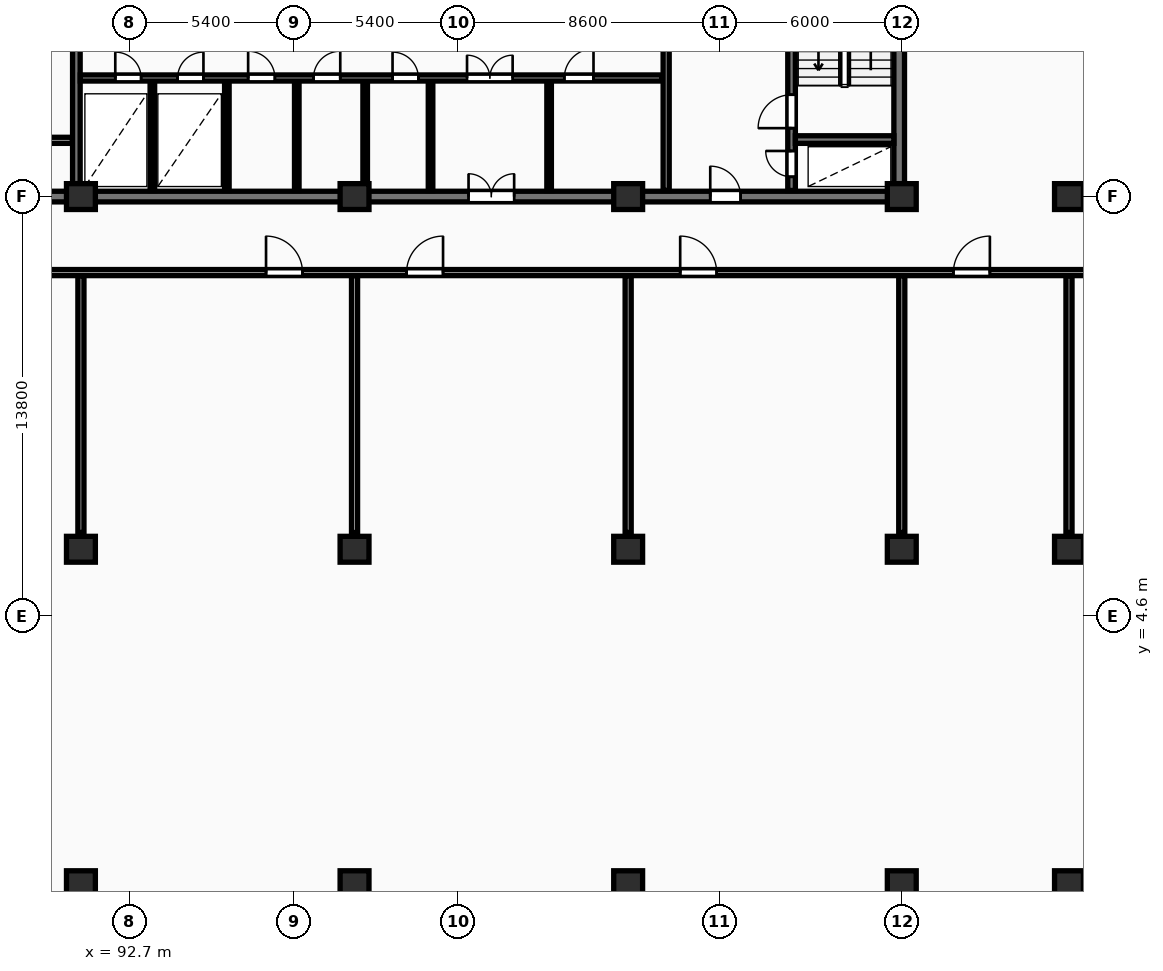
"""IFC4 building model, lengths in metres.
Left out: names, types, materials, properties, quantities, classifications, styles, units other than length and angle.
Written with IfcOpenShell. Run it as: python <this file> out.ifc"""

import sys

from ifc_helpers import new_model, si_unit, direction, frame, frame_2d, origin, origin_2d, place, context, subcontext, project, spatial, rectangle, extrude, element, fill, save


model = new_model("IFC4")
c1 = context("Model", 3, precision=1e-05, world=origin(), true_north=direction((0.0, 1.0)))
c2 = subcontext(c1, "Body", "Model", "MODEL_VIEW")
j1 = project(units=[si_unit("LENGTHUNIT", "METRE"), si_unit("PLANEANGLEUNIT", "RADIAN")], contexts=[c1])
p1 = place(None, origin())
s1 = spatial("IfcSite", under=j1, at=p1, CompositionType="ELEMENT")
p2 = place(p1, origin())
s2 = spatial("IfcBuilding", under=s1, at=p2, CompositionType="ELEMENT")
p3 = place(p2, frame((0.0, 0.0, 76.0)))
s3 = spatial("IfcBuildingStorey", under=s2, at=p3, CompositionType="ELEMENT", Elevation=76.0)
for number, where, z_axis, x_axis in (
    (1, (91.1, -4.2, 0.0), (0.0, 0.0, 1.0), (1.0, 0.0, 0.0)),
    (2, (91.1, 6.8, 0.0), (0.0, 0.0, 1.0), (1.0, 0.0, 0.0)),
    (3, (91.1, 18.4, 0.0), (0.0, 0.0, 1.0), (1.0, 0.0, 0.0)),
    (4, (100.1, -4.2, 0.0), (0.0, 0.0, 1.0), (1.0, 0.0, 0.0)),
    (5, (100.1, 6.8, 0.0), (0.0, 0.0, 1.0), (1.0, 0.0, 0.0)),
    (6, (100.1, 18.4, 0.0), (0.0, 0.0, 1.0), (1.0, 0.0, 0.0)),
    (7, (109.1, -4.2, 0.0), (0.0, 0.0, 1.0), (1.0, 0.0, 0.0)),
    (8, (109.1, 6.8, 0.0), (0.0, 0.0, 1.0), (1.0, 0.0, 0.0)),
    (9, (109.1, 18.4, 0.0), (0.0, 0.0, 1.0), (1.0, 0.0, 0.0)),
    (10, (118.1, -4.2, 0.0), (0.0, 0.0, 1.0), (1.0, 0.0, 0.0)),
    (11, (118.1, 6.8, 0.0), (0.0, 0.0, 1.0), (1.0, 0.0, 0.0)),
    (12, (118.1, 18.4, 0.0), (0.0, 0.0, 1.0), (1.0, 0.0, 0.0)),
    (13, (123.6, -4.2, 0.0), (0.0, 0.0, 1.0), (1.0, 0.0, 0.0)),
    (14, (123.6, 6.8, 0.0), (0.0, 0.0, 1.0), (1.0, 0.0, 0.0)),
    (15, (123.6, 18.4, 0.0), (0.0, 0.0, 1.0), (1.0, 0.0, 0.0)),
):
    element("IfcColumn", number, at=place(p3, frame(where, z_axis=z_axis, x_axis=x_axis)), inside=s3, PredefinedType="COLUMN", context=c2, shape_type="SweptSolid", body=[
        extrude(rectangle(XDim=0.95, YDim=0.85, at=origin_2d()), origin(), (0.0, 0.0, 1.0), 4.8),
    ])
p4 = place(p3, frame((118.015, 18.575, 0.0), z_axis=(0.0, 0.0, 1.0), x_axis=(0.0, 1.0, 0.0)))
e16 = element("IfcWall", 16, at=p4, inside=s3, PredefinedType="SHEAR", context=c2, shape_type="SweptSolid", body=[
    extrude(rectangle(XDim=11.65, YDim=0.35, at=frame_2d((5.825, 0.0))), origin(), (0.0, 0.0, 1.0), 4.8),
])
p5 = place(p3, frame((81.925, 18.4, 0.0), z_axis=(0.0, 0.0, 1.0), x_axis=(1.0, 0.0, 0.0)))
e17 = element("IfcWall", 17, at=p5, inside=s3, PredefinedType="SHEAR", context=c2, shape_type="SweptSolid", body=[
    extrude(rectangle(XDim=36.265, YDim=0.35, at=frame_2d((18.132, 0.0))), origin(), (0.0, 0.0, 1.0), 4.8),
])
p6 = place(p5, frame((5.675, 0.0, 0.0)))
e18 = element("IfcOpeningElement", 18, at=p6, cuts=e17, PredefinedType="OPENING", context=c2, shape_type="SweptSolid", body=[
    extrude(rectangle(XDim=1.0, YDim=2.15, at=frame_2d((0.5, 1.075))), frame((0.0, 0.185, 0.0), z_axis=(0.0, -1.0, 0.0), x_axis=(1.0, 0.0, 0.0)), (0.0, 0.0, 1.0), 0.37),
])
p7 = place(p5, frame((21.925, 0.0, 0.0)))
e19 = element("IfcOpeningElement", 19, at=p7, cuts=e17, PredefinedType="OPENING", context=c2, shape_type="SweptSolid", body=[
    extrude(rectangle(XDim=1.5, YDim=2.2, at=frame_2d((0.75, 1.1))), frame((0.0, 0.185, 0.0), z_axis=(0.0, -1.0, 0.0), x_axis=(1.0, 0.0, 0.0)), (0.0, 0.0, 1.0), 0.37),
])
p8 = place(p5, frame((29.875, 0.0, 0.0)))
e20 = element("IfcOpeningElement", 20, at=p8, cuts=e17, PredefinedType="OPENING", context=c2, shape_type="SweptSolid", body=[
    extrude(rectangle(XDim=1.0, YDim=2.15, at=frame_2d((0.5, 1.075))), frame((0.0, 0.185, 0.0), z_axis=(0.0, -1.0, 0.0), x_axis=(1.0, 0.0, 0.0)), (0.0, 0.0, 1.0), 0.37),
])
p9 = place(p3, frame((86.5, 20.25, 0.0), z_axis=(0.0, 0.0, 1.0), x_axis=(1.0, 0.0, 0.0)))
e21 = element("IfcWall", 21, at=p9, inside=s3, PredefinedType="PARTITIONING", context=c2, shape_type="SweptSolid", body=[
    extrude(rectangle(XDim=4.32, YDim=0.2, at=frame_2d((2.16, 0.0))), origin(), (0.0, 0.0, 1.0), 4.48),
])
p10 = place(p9, frame((1.4, 0.0, 0.0)))
e22 = element("IfcOpeningElement", 22, at=p10, cuts=e21, PredefinedType="OPENING", context=c2, shape_type="SweptSolid", body=[
    extrude(rectangle(XDim=1.1, YDim=2.1, at=frame_2d((0.55, 1.05))), frame((0.0, 0.11, 0.0), z_axis=(0.0, -1.0, 0.0), x_axis=(1.0, 0.0, 0.0)), (0.0, 0.0, 1.0), 0.22),
])
p11 = place(p3, frame((90.95, 18.6, 0.0), z_axis=(0.0, 0.0, 1.0), x_axis=(0.0, 1.0, 0.0)))
e23 = element("IfcWall", 23, at=p11, inside=s3, PredefinedType="SHEAR", context=c2, shape_type="SweptSolid", body=[
    extrude(rectangle(XDim=11.6, YDim=0.25, at=frame_2d((5.8, 0.0))), origin(), (0.0, 0.0, 1.0), 4.8),
])
p12 = place(p11, frame((4.6, 0.0, 0.0)))
e24 = element("IfcOpeningElement", 24, at=p12, cuts=e23, PredefinedType="OPENING", context=c2, shape_type="SweptSolid", body=[
    extrude(rectangle(XDim=1.1, YDim=2.1, at=frame_2d((0.55, 1.05))), frame((0.0, 0.135, 0.0), z_axis=(0.0, -1.0, 0.0), x_axis=(1.0, 0.0, 0.0)), (0.0, 0.0, 1.0), 0.27),
])
for number, where, z_axis, x_axis in (
    (25, (93.45, 18.6, 0.0), (0.0, 0.0, 1.0), (0.0, 1.0, 0.0)),
    (26, (95.9, 18.6, 0.0), (0.0, 0.0, 1.0), (0.0, 1.0, 0.0)),
    (27, (98.2, 18.6, 0.0), (0.0, 0.0, 1.0), (0.0, 1.0, 0.0)),
):
    element("IfcWall", number, at=place(p3, frame(where, z_axis=z_axis, x_axis=x_axis)), inside=s3, PredefinedType="PARTITIONING", context=c2, shape_type="SweptSolid", body=[
        extrude(rectangle(XDim=3.6, YDim=0.15, at=frame_2d((1.8, 0.0))), origin(), (0.0, 0.0, 1.0), 4.48),
    ])
p13 = place(p3, frame((100.45, 18.6, 0.0), z_axis=(0.0, 0.0, 1.0), x_axis=(0.0, 1.0, 0.0)))
e28 = element("IfcWall", 28, at=p13, inside=s3, PredefinedType="PARTITIONING", context=c2, shape_type="SweptSolid", body=[
    extrude(rectangle(XDim=3.6, YDim=0.15, at=frame_2d((1.8, 0.0))), origin(), (0.0, 0.0, 1.0), 3.33),
])
for number, where, z_axis, x_axis in (
    (29, (102.6, 18.6, 0.0), (0.0, 0.0, 1.0), (0.0, 1.0, 0.0)),
    (30, (106.5, 18.6, 0.0), (0.0, 0.0, 1.0), (0.0, 1.0, 0.0)),
):
    element("IfcWall", number, at=place(p3, frame(where, z_axis=z_axis, x_axis=x_axis)), inside=s3, PredefinedType="PARTITIONING", context=c2, shape_type="SweptSolid", body=[
        extrude(rectangle(XDim=3.6, YDim=0.15, at=frame_2d((1.8, 0.0))), origin(), (0.0, 0.0, 1.0), 4.48),
    ])
p14 = place(p3, frame((91.08, 22.3, 0.0), z_axis=(0.0, 0.0, 1.0), x_axis=(1.0, 0.0, 0.0)))
e31 = element("IfcWall", 31, at=p14, inside=s3, PredefinedType="PARTITIONING", context=c2, shape_type="SweptSolid", body=[
    extrude(rectangle(XDim=19.14, YDim=0.2, at=frame_2d((9.57, 0.0))), origin(), (0.0, 0.0, 1.0), 4.48),
])
p15 = place(p14, frame((1.15, 0.0, 0.0)))
e32 = element("IfcOpeningElement", 32, at=p15, cuts=e31, PredefinedType="OPENING", context=c2, shape_type="SweptSolid", body=[
    extrude(rectangle(XDim=0.85, YDim=2.05, at=frame_2d((0.425, 1.025))), frame((0.0, 0.11, 0.0), z_axis=(0.0, -1.0, 0.0), x_axis=(1.0, 0.0, 0.0)), (0.0, 0.0, 1.0), 0.22),
])
p16 = place(p14, frame((3.2, 0.0, 0.0)))
e33 = element("IfcOpeningElement", 33, at=p16, cuts=e31, PredefinedType="OPENING", context=c2, shape_type="SweptSolid", body=[
    extrude(rectangle(XDim=0.85, YDim=2.05, at=frame_2d((0.425, 1.025))), frame((0.0, 0.11, 0.0), z_axis=(0.0, -1.0, 0.0), x_axis=(1.0, 0.0, 0.0)), (0.0, 0.0, 1.0), 0.22),
])
p17 = place(p14, frame((12.72, 0.0, 0.0)))
e34 = element("IfcOpeningElement", 34, at=p17, cuts=e31, PredefinedType="OPENING", context=c2, shape_type="SweptSolid", body=[
    extrude(rectangle(XDim=1.5, YDim=2.2, at=frame_2d((0.75, 1.1))), frame((0.0, 0.11, 0.0), z_axis=(0.0, -1.0, 0.0), x_axis=(1.0, 0.0, 0.0)), (0.0, 0.0, 1.0), 0.22),
])
p18 = place(p14, frame((5.52, 0.0, 0.0)))
e35 = element("IfcOpeningElement", 35, at=p18, cuts=e31, PredefinedType="OPENING", context=c2, shape_type="SweptSolid", body=[
    extrude(rectangle(XDim=0.88, YDim=2.06, at=frame_2d((0.44, 1.03))), frame((0.0, 0.11, 0.0), z_axis=(0.0, -1.0, 0.0), x_axis=(1.0, 0.0, 0.0)), (0.0, 0.0, 1.0), 0.22),
])
p19 = place(p14, frame((7.67, 0.0, 0.0)))
e36 = element("IfcOpeningElement", 36, at=p19, cuts=e31, PredefinedType="OPENING", context=c2, shape_type="SweptSolid", body=[
    extrude(rectangle(XDim=0.88, YDim=2.06, at=frame_2d((0.44, 1.03))), frame((0.0, 0.11, 0.0), z_axis=(0.0, -1.0, 0.0), x_axis=(1.0, 0.0, 0.0)), (0.0, 0.0, 1.0), 0.22),
])
p20 = place(p14, frame((10.27, 0.0, 0.0)))
e37 = element("IfcOpeningElement", 37, at=p20, cuts=e31, PredefinedType="OPENING", context=c2, shape_type="SweptSolid", body=[
    extrude(rectangle(XDim=0.85, YDim=2.05, at=frame_2d((0.425, 1.025))), frame((0.0, 0.11, 0.0), z_axis=(0.0, -1.0, 0.0), x_axis=(1.0, 0.0, 0.0)), (0.0, 0.0, 1.0), 0.22),
])
p21 = place(p14, frame((15.92, 0.0, 0.0)))
e38 = element("IfcOpeningElement", 38, at=p21, cuts=e31, PredefinedType="OPENING", context=c2, shape_type="SweptSolid", body=[
    extrude(rectangle(XDim=0.96, YDim=2.1, at=frame_2d((0.48, 1.05))), frame((0.0, 0.11, 0.0), z_axis=(0.0, -1.0, 0.0), x_axis=(1.0, 0.0, 0.0)), (0.0, 0.0, 1.0), 0.22),
])
p22 = place(p3, frame((110.35, 18.6, 0.0), z_axis=(0.0, 0.0, 1.0), x_axis=(0.0, 1.0, 0.0)))
e39 = element("IfcWall", 39, at=p22, inside=s3, PredefinedType="PARTITIONING", context=c2, shape_type="SweptSolid", body=[
    extrude(rectangle(XDim=11.6, YDim=0.2, at=frame_2d((5.8, 0.0))), origin(), (0.0, 0.0, 1.0), 4.48),
])
p23 = place(p22, frame((5.2, 0.0, 0.0)))
e40 = element("IfcOpeningElement", 40, at=p23, cuts=e39, PredefinedType="OPENING", context=c2, shape_type="SweptSolid", body=[
    extrude(rectangle(XDim=1.1, YDim=2.15, at=frame_2d((0.55, 1.075))), frame((0.0, 0.11, 0.0), z_axis=(0.0, -1.0, 0.0), x_axis=(1.0, 0.0, 0.0)), (0.0, 0.0, 1.0), 0.22),
])
p24 = place(p3, frame((114.475, 18.6, 0.0), z_axis=(0.0, 0.0, 1.0), x_axis=(0.0, 1.0, 0.0)))
e41 = element("IfcWall", 41, at=p24, inside=s3, PredefinedType="SHEAR", context=c2, shape_type="SweptSolid", body=[
    extrude(rectangle(XDim=11.6, YDim=0.25, at=frame_2d((5.8, 0.0))), origin(), (0.0, 0.0, 1.0), 4.8),
])
p25 = place(p24, frame((0.45, 0.0, 0.0)))
e42 = element("IfcOpeningElement", 42, at=p25, cuts=e41, PredefinedType="OPENING", context=c2, shape_type="SweptSolid", body=[
    extrude(rectangle(XDim=0.85, YDim=2.05, at=frame_2d((0.425, 1.025))), frame((0.0, 0.135, 0.0), z_axis=(0.0, -1.0, 0.0), x_axis=(1.0, 0.0, 0.0)), (0.0, 0.0, 1.0), 0.27),
])
p26 = place(p24, frame((2.05, 0.0, 0.0)))
e43 = element("IfcOpeningElement", 43, at=p26, cuts=e41, PredefinedType="OPENING", context=c2, shape_type="SweptSolid", body=[
    extrude(rectangle(XDim=1.1, YDim=2.1, at=frame_2d((0.55, 1.05))), frame((0.0, 0.135, 0.0), z_axis=(0.0, -1.0, 0.0), x_axis=(1.0, 0.0, 0.0)), (0.0, 0.0, 1.0), 0.27),
])
p27 = place(p24, frame((9.95, 0.0, 0.0)))
e44 = element("IfcOpeningElement", 44, at=p27, cuts=e41, PredefinedType="OPENING", context=c2, shape_type="SweptSolid", body=[
    extrude(rectangle(XDim=0.85, YDim=2.05, at=frame_2d((0.425, 1.025))), frame((0.0, 0.135, 0.0), z_axis=(0.0, -1.0, 0.0), x_axis=(1.0, 0.0, 0.0)), (0.0, 0.0, 1.0), 0.27),
])
p28 = place(p3, frame((114.6, 20.275, 0.0), z_axis=(0.0, 0.0, 1.0), x_axis=(1.0, 0.0, 0.0)))
e45 = element("IfcWall", 45, at=p28, inside=s3, PredefinedType="SHEAR", context=c2, shape_type="SweptSolid", body=[
    extrude(rectangle(XDim=3.24, YDim=0.25, at=frame_2d((1.62, 0.0))), origin(), (0.0, 0.0, 1.0), 4.8),
])
for number, where, z_axis, x_axis in (
    (46, (91.1, 7.35, 0.0), (0.0, 0.0, 1.0), (0.0, 1.0, 0.0)),
    (47, (100.1, 7.35, 0.0), (0.0, 0.0, 1.0), (0.0, 1.0, 0.0)),
    (48, (109.1, 7.35, 0.0), (0.0, 0.0, 1.0), (0.0, 1.0, 0.0)),
    (49, (118.1, 7.35, 0.0), (0.0, 0.0, 1.0), (0.0, 1.0, 0.0)),
    (50, (123.6, 7.35, 0.0), (0.0, 0.0, 1.0), (0.0, 1.0, 0.0)),
):
    element("IfcWall", number, at=place(p3, frame(where, z_axis=z_axis, x_axis=x_axis)), inside=s3, PredefinedType="PARTITIONING", context=c2, shape_type="SweptSolid", body=[
        extrude(rectangle(XDim=8.45, YDim=0.2, at=frame_2d((4.225, 0.0))), origin(), (0.0, 0.0, 1.0), 3.33),
    ])
p29 = place(p3, frame((70.7, 15.9, 0.0), z_axis=(0.0, 0.0, 1.0), x_axis=(1.0, 0.0, 0.0)))
e51 = element("IfcWall", 51, at=p29, inside=s3, PredefinedType="PARTITIONING", context=c2, shape_type="SweptSolid", body=[
    extrude(rectangle(XDim=62.0, YDim=0.2, at=frame_2d((31.0, 0.0))), origin(), (0.0, 0.0, 1.0), 4.48),
])
p30 = place(p29, frame((8.226, 0.0, 0.0)))
e52 = element("IfcOpeningElement", 52, at=p30, cuts=e51, PredefinedType="OPENING", context=c2, shape_type="SweptSolid", body=[
    extrude(rectangle(XDim=1.5, YDim=2.18, at=frame_2d((0.75, 1.09))), frame((0.0, 0.11, 0.0), z_axis=(0.0, -1.0, 0.0), x_axis=(1.0, 0.0, 0.0)), (0.0, 0.0, 1.0), 0.22),
])
p31 = place(p29, frame((17.489, 0.0, 0.0)))
e53 = element("IfcOpeningElement", 53, at=p31, cuts=e51, PredefinedType="OPENING", context=c2, shape_type="SweptSolid", body=[
    extrude(rectangle(XDim=1.2, YDim=2.15, at=frame_2d((0.6, 1.075))), frame((0.0, 0.11, 0.0), z_axis=(0.0, -1.0, 0.0), x_axis=(1.0, 0.0, 0.0)), (0.0, 0.0, 1.0), 0.22),
])
p32 = place(p29, frame((26.489, 0.0, 0.0)))
e54 = element("IfcOpeningElement", 54, at=p32, cuts=e51, PredefinedType="OPENING", context=c2, shape_type="SweptSolid", body=[
    extrude(rectangle(XDim=1.2, YDim=2.15, at=frame_2d((0.6, 1.075))), frame((0.0, 0.11, 0.0), z_axis=(0.0, -1.0, 0.0), x_axis=(1.0, 0.0, 0.0)), (0.0, 0.0, 1.0), 0.22),
])
p33 = place(p29, frame((31.111, 0.0, 0.0)))
e55 = element("IfcOpeningElement", 55, at=p33, cuts=e51, PredefinedType="OPENING", context=c2, shape_type="SweptSolid", body=[
    extrude(rectangle(XDim=1.2, YDim=2.15, at=frame_2d((0.6, 1.075))), frame((0.0, 0.11, 0.0), z_axis=(0.0, -1.0, 0.0), x_axis=(1.0, 0.0, 0.0)), (0.0, 0.0, 1.0), 0.22),
])
p34 = place(p29, frame((40.111, 0.0, 0.0)))
e56 = element("IfcOpeningElement", 56, at=p34, cuts=e51, PredefinedType="OPENING", context=c2, shape_type="SweptSolid", body=[
    extrude(rectangle(XDim=1.2, YDim=2.15, at=frame_2d((0.6, 1.075))), frame((0.0, 0.11, 0.0), z_axis=(0.0, -1.0, 0.0), x_axis=(1.0, 0.0, 0.0)), (0.0, 0.0, 1.0), 0.22),
])
p35 = place(p29, frame((49.098, 0.0, 0.0)))
e57 = element("IfcOpeningElement", 57, at=p35, cuts=e51, PredefinedType="OPENING", context=c2, shape_type="SweptSolid", body=[
    extrude(rectangle(XDim=1.2, YDim=2.15, at=frame_2d((0.6, 1.075))), frame((0.0, 0.11, 0.0), z_axis=(0.0, -1.0, 0.0), x_axis=(1.0, 0.0, 0.0)), (0.0, 0.0, 1.0), 0.22),
])
p36 = place(p29, frame((54.662, 0.0, 0.0)))
e58 = element("IfcOpeningElement", 58, at=p36, cuts=e51, PredefinedType="OPENING", context=c2, shape_type="SweptSolid", body=[
    extrude(rectangle(XDim=1.2, YDim=2.15, at=frame_2d((0.6, 1.075))), frame((0.0, 0.11, 0.0), z_axis=(0.0, -1.0, 0.0), x_axis=(1.0, 0.0, 0.0)), (0.0, 0.0, 1.0), 0.22),
])
p37 = place(p7, origin())
e59 = element("IfcDoor", 59, at=p37, inside=s3, OperationType="DOUBLE_DOOR_SINGLE_SWING", PredefinedType="DOOR", context=c2, shape_type="SweptSolid", body=[
    extrude(rectangle(XDim=1.5, YDim=2.2, at=frame_2d((0.75, 1.1))), frame((0.0, 0.025, 0.0), z_axis=(0.0, -1.0, 0.0), x_axis=(1.0, 0.0, 0.0)), (0.0, 0.0, 1.0), 0.05),
])
fill(e19, e59)
p38 = place(p8, origin())
e60 = element("IfcDoor", 60, at=p38, inside=s3, OperationType="SINGLE_SWING_LEFT", PredefinedType="DOOR", context=c2, shape_type="SweptSolid", body=[
    extrude(rectangle(XDim=1.0, YDim=2.15, at=frame_2d((0.5, 1.075))), frame((0.0, 0.025, 0.0), z_axis=(0.0, -1.0, 0.0), x_axis=(1.0, 0.0, 0.0)), (0.0, 0.0, 1.0), 0.05),
])
fill(e20, e60)
p39 = place(p15, origin())
e61 = element("IfcDoor", 61, at=p39, inside=s3, OperationType="SINGLE_SWING_LEFT", PredefinedType="DOOR", context=c2, shape_type="SweptSolid", body=[
    extrude(rectangle(XDim=0.85, YDim=2.05, at=frame_2d((0.425, 1.025))), frame((0.0, 0.025, 0.0), z_axis=(0.0, -1.0, 0.0), x_axis=(1.0, 0.0, 0.0)), (0.0, 0.0, 1.0), 0.05),
])
fill(e32, e61)
p40 = place(p16, origin())
e62 = element("IfcDoor", 62, at=p40, inside=s3, OperationType="SINGLE_SWING_RIGHT", PredefinedType="DOOR", context=c2, shape_type="SweptSolid", body=[
    extrude(rectangle(XDim=0.85, YDim=2.05, at=frame_2d((0.425, 1.025))), frame((0.0, 0.025, 0.0), z_axis=(0.0, -1.0, 0.0), x_axis=(1.0, 0.0, 0.0)), (0.0, 0.0, 1.0), 0.05),
])
fill(e33, e62)
p41 = place(p17, origin())
e63 = element("IfcDoor", 63, at=p41, inside=s3, OperationType="DOUBLE_DOOR_SINGLE_SWING", PredefinedType="DOOR", context=c2, shape_type="SweptSolid", body=[
    extrude(rectangle(XDim=1.5, YDim=2.2, at=frame_2d((0.75, 1.1))), frame((0.0, 0.025, 0.0), z_axis=(0.0, -1.0, 0.0), x_axis=(1.0, 0.0, 0.0)), (0.0, 0.0, 1.0), 0.05),
])
fill(e34, e63)
p42 = place(p18, origin())
e64 = element("IfcDoor", 64, at=p42, inside=s3, OperationType="SINGLE_SWING_LEFT", PredefinedType="DOOR", context=c2, shape_type="SweptSolid", body=[
    extrude(rectangle(XDim=0.88, YDim=2.06, at=frame_2d((0.44, 1.03))), frame((0.0, 0.025, 0.0), z_axis=(0.0, -1.0, 0.0), x_axis=(1.0, 0.0, 0.0)), (0.0, 0.0, 1.0), 0.05),
])
fill(e35, e64)
p43 = place(p19, origin())
e65 = element("IfcDoor", 65, at=p43, inside=s3, OperationType="SINGLE_SWING_RIGHT", PredefinedType="DOOR", context=c2, shape_type="SweptSolid", body=[
    extrude(rectangle(XDim=0.88, YDim=2.06, at=frame_2d((0.44, 1.03))), frame((0.0, 0.025, 0.0), z_axis=(0.0, -1.0, 0.0), x_axis=(1.0, 0.0, 0.0)), (0.0, 0.0, 1.0), 0.05),
])
fill(e36, e65)
p44 = place(p20, origin())
e66 = element("IfcDoor", 66, at=p44, inside=s3, OperationType="SINGLE_SWING_LEFT", PredefinedType="DOOR", context=c2, shape_type="SweptSolid", body=[
    extrude(rectangle(XDim=0.85, YDim=2.05, at=frame_2d((0.425, 1.025))), frame((0.0, 0.025, 0.0), z_axis=(0.0, -1.0, 0.0), x_axis=(1.0, 0.0, 0.0)), (0.0, 0.0, 1.0), 0.05),
])
fill(e37, e66)
p45 = place(p21, origin())
e67 = element("IfcDoor", 67, at=p45, inside=s3, OperationType="SINGLE_SWING_RIGHT", PredefinedType="DOOR", context=c2, shape_type="SweptSolid", body=[
    extrude(rectangle(XDim=0.96, YDim=2.1, at=frame_2d((0.48, 1.05))), frame((0.0, 0.025, 0.0), z_axis=(0.0, -1.0, 0.0), x_axis=(1.0, 0.0, 0.0)), (0.0, 0.0, 1.0), 0.05),
])
fill(e38, e67)
p46 = place(p25, origin())
e68 = element("IfcDoor", 68, at=p46, inside=s3, OperationType="SINGLE_SWING_RIGHT", PredefinedType="DOOR", context=c2, shape_type="SweptSolid", body=[
    extrude(rectangle(XDim=0.85, YDim=2.05, at=frame_2d((0.425, 1.025))), frame((0.0, 0.025, 0.0), z_axis=(0.0, -1.0, 0.0), x_axis=(1.0, 0.0, 0.0)), (0.0, 0.0, 1.0), 0.05),
])
fill(e42, e68)
p47 = place(p26, origin())
e69 = element("IfcDoor", 69, at=p47, inside=s3, OperationType="SINGLE_SWING_LEFT", PredefinedType="DOOR", context=c2, shape_type="SweptSolid", body=[
    extrude(rectangle(XDim=1.1, YDim=2.1, at=frame_2d((0.55, 1.05))), frame((0.0, 0.025, 0.0), z_axis=(0.0, -1.0, 0.0), x_axis=(1.0, 0.0, 0.0)), (0.0, 0.0, 1.0), 0.05),
])
fill(e43, e69)
p48 = place(p32, origin())
e70 = element("IfcDoor", 70, at=p48, inside=s3, OperationType="SINGLE_SWING_LEFT", PredefinedType="DOOR", context=c2, shape_type="SweptSolid", body=[
    extrude(rectangle(XDim=1.2, YDim=2.15, at=frame_2d((0.6, 1.075))), frame((0.0, 0.025, 0.0), z_axis=(0.0, -1.0, 0.0), x_axis=(1.0, 0.0, 0.0)), (0.0, 0.0, 1.0), 0.05),
])
fill(e54, e70)
p49 = place(p33, origin())
e71 = element("IfcDoor", 71, at=p49, inside=s3, OperationType="SINGLE_SWING_RIGHT", PredefinedType="DOOR", context=c2, shape_type="SweptSolid", body=[
    extrude(rectangle(XDim=1.2, YDim=2.15, at=frame_2d((0.6, 1.075))), frame((0.0, 0.025, 0.0), z_axis=(0.0, -1.0, 0.0), x_axis=(1.0, 0.0, 0.0)), (0.0, 0.0, 1.0), 0.05),
])
fill(e55, e71)
p50 = place(p34, origin())
e72 = element("IfcDoor", 72, at=p50, inside=s3, OperationType="SINGLE_SWING_LEFT", PredefinedType="DOOR", context=c2, shape_type="SweptSolid", body=[
    extrude(rectangle(XDim=1.2, YDim=2.15, at=frame_2d((0.6, 1.075))), frame((0.0, 0.025, 0.0), z_axis=(0.0, -1.0, 0.0), x_axis=(1.0, 0.0, 0.0)), (0.0, 0.0, 1.0), 0.05),
])
fill(e56, e72)
p51 = place(p35, origin())
e73 = element("IfcDoor", 73, at=p51, inside=s3, OperationType="SINGLE_SWING_RIGHT", PredefinedType="DOOR", context=c2, shape_type="SweptSolid", body=[
    extrude(rectangle(XDim=1.2, YDim=2.15, at=frame_2d((0.6, 1.075))), frame((0.0, 0.025, 0.0), z_axis=(0.0, -1.0, 0.0), x_axis=(1.0, 0.0, 0.0)), (0.0, 0.0, 1.0), 0.05),
])
fill(e57, e73)
save(model, sys.argv[1])
